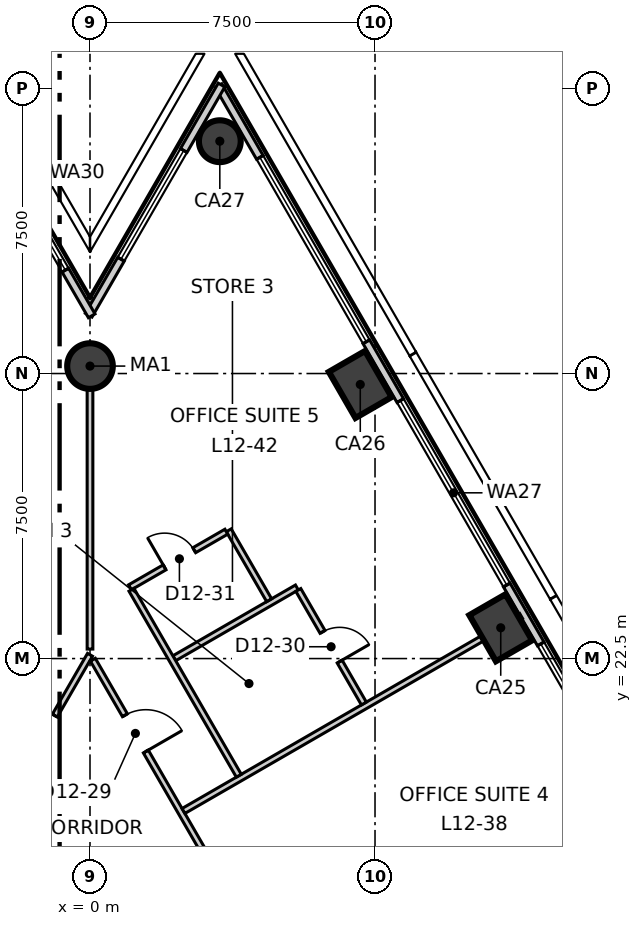
"""IFC4 building model, lengths in metres.
Left out: names, types, materials, properties, quantities, classifications, styles, units other than length and angle.
Written with IfcOpenShell. Run it as: python <this file> out.ifc"""

import sys

from ifc_helpers import new_model, si_unit, direction, frame, frame_2d, origin, origin_2d, place, context, subcontext, project, spatial, rectangle, circle, extrude, element, fill, save


model = new_model("IFC4")
c1 = context("Model", 3, precision=1e-05, world=origin(), true_north=direction((0.0, 1.0)))
c2 = subcontext(c1, "Body", "Model", "MODEL_VIEW")
j1 = project(units=[si_unit("LENGTHUNIT", "METRE"), si_unit("PLANEANGLEUNIT", "RADIAN")], contexts=[c1])
p1 = place(None, origin())
s1 = spatial("IfcSite", under=j1, at=p1, CompositionType="ELEMENT")
p2 = place(p1, origin())
s2 = spatial("IfcBuilding", under=s1, at=p2, CompositionType="ELEMENT")
p3 = place(p2, frame((0.0, 0.0, 59.3)))
s3 = spatial("IfcBuildingStorey", under=s2, at=p3, CompositionType="ELEMENT", Elevation=59.3)
for number, where, z_axis, x_axis in (
    (1, (10.808, 23.31, -0.3), (0.0, 0.0, 1.0), (-0.5, 0.866, 0.0)),
    (2, (7.112, 29.712, -0.3), (0.0, 0.0, 1.0), (-0.5, 0.866, 0.0)),
):
    element("IfcColumn", number, at=place(p3, frame(where, z_axis=z_axis, x_axis=x_axis)), inside=s3, PredefinedType="COLUMN", context=c2, shape_type="SweptSolid", body=[
        extrude(rectangle(XDim=1.4, YDim=1.1, at=origin_2d()), origin(), (0.0, 0.0, 1.0), 4.0),
    ])
p4 = place(p3, frame((3.416, 36.113, -0.3), z_axis=(0.0, 0.0, 1.0), x_axis=(-0.5, 0.866025403784, 0.0)))
e3 = element("IfcColumn", 3, at=p4, inside=s3, PredefinedType="COLUMN", context=c2, shape_type="SweptSolid", body=[
    extrude(circle(Radius=0.55, at=origin_2d()), origin(), (0.0, 0.0, 1.0), 4.0),
])
p5 = place(p3, frame((0.0, 30.196, -0.3), z_axis=(0.0, 0.0, 1.0), x_axis=(1.0, 0.0, 0.0)))
e4 = element("IfcColumn", 4, at=p5, inside=s3, PredefinedType="COLUMN", context=c2, shape_type="SweptSolid", body=[
    extrude(circle(Radius=0.6, at=origin_2d()), origin(), (0.0, 0.0, 1.0), 4.0),
])
p6 = place(p3, frame((34.241, -15.876, 0.0), z_axis=(0.0, 0.0, 1.0), x_axis=(-0.500006313899, 0.866021758423, 0.0)))
e5 = element("IfcWall", 5, at=p6, inside=s3, PredefinedType="ELEMENTEDWALL", context=c2, shape_type="SweptSolid", body=[
    extrude(rectangle(XDim=61.719, YDim=0.2, at=frame_2d((30.859, 0.0))), origin(), (0.0, 0.0, 1.0), 3.7),
])
p7 = place(p6, frame((2.199, 0.0, 0.9)))
e6 = element("IfcOpeningElement", 6, at=p7, cuts=e5, PredefinedType="OPENING", context=c2, shape_type="SweptSolid", body=[
    extrude(rectangle(XDim=5.6, YDim=2.5, at=frame_2d((2.8, 1.25))), frame((0.0, 0.11, 0.0), z_axis=(0.0, -1.0, 0.0), x_axis=(1.0, 0.0, 0.0)), (0.0, 0.0, 1.0), 0.22),
])
p8 = place(p6, frame((9.59, 0.0, 0.9)))
e7 = element("IfcOpeningElement", 7, at=p8, cuts=e5, PredefinedType="OPENING", context=c2, shape_type="SweptSolid", body=[
    extrude(rectangle(XDim=5.6, YDim=2.5, at=frame_2d((2.8, 1.25))), frame((0.0, 0.11, 0.0), z_axis=(0.0, -1.0, 0.0), x_axis=(1.0, 0.0, 0.0)), (0.0, 0.0, 1.0), 0.22),
])
p9 = place(p6, frame((16.982, 0.0, 0.9)))
e8 = element("IfcOpeningElement", 8, at=p9, cuts=e5, PredefinedType="OPENING", context=c2, shape_type="SweptSolid", body=[
    extrude(rectangle(XDim=5.6, YDim=2.5, at=frame_2d((2.8, 1.25))), frame((0.0, 0.11, 0.0), z_axis=(0.0, -1.0, 0.0), x_axis=(1.0, 0.0, 0.0)), (0.0, 0.0, 1.0), 0.22),
])
p10 = place(p6, frame((24.374, 0.0, 0.9)))
e9 = element("IfcOpeningElement", 9, at=p10, cuts=e5, PredefinedType="OPENING", context=c2, shape_type="SweptSolid", body=[
    extrude(rectangle(XDim=5.6, YDim=2.5, at=frame_2d((2.8, 1.25))), frame((0.0, 0.11, 0.0), z_axis=(0.0, -1.0, 0.0), x_axis=(1.0, 0.0, 0.0)), (0.0, 0.0, 1.0), 0.22),
])
p11 = place(p6, frame((31.765, 0.0, 0.9)))
e10 = element("IfcOpeningElement", 10, at=p11, cuts=e5, PredefinedType="OPENING", context=c2, shape_type="SweptSolid", body=[
    extrude(rectangle(XDim=5.6, YDim=2.5, at=frame_2d((2.8, 1.25))), frame((0.0, 0.11, 0.0), z_axis=(0.0, -1.0, 0.0), x_axis=(1.0, 0.0, 0.0)), (0.0, 0.0, 1.0), 0.22),
])
p12 = place(p6, frame((39.157, 0.0, 0.9)))
e11 = element("IfcOpeningElement", 11, at=p12, cuts=e5, PredefinedType="OPENING", context=c2, shape_type="SweptSolid", body=[
    extrude(rectangle(XDim=5.6, YDim=2.5, at=frame_2d((2.8, 1.25))), frame((0.0, 0.11, 0.0), z_axis=(0.0, -1.0, 0.0), x_axis=(1.0, 0.0, 0.0)), (0.0, 0.0, 1.0), 0.22),
])
p13 = place(p6, frame((46.549, 0.0, 0.9)))
e12 = element("IfcOpeningElement", 12, at=p13, cuts=e5, PredefinedType="OPENING", context=c2, shape_type="SweptSolid", body=[
    extrude(rectangle(XDim=5.6, YDim=2.5, at=frame_2d((2.8, 1.25))), frame((0.0, 0.11, 0.0), z_axis=(0.0, -1.0, 0.0), x_axis=(1.0, 0.0, 0.0)), (0.0, 0.0, 1.0), 0.22),
])
p14 = place(p6, frame((53.94, 0.0, 0.9)))
e13 = element("IfcOpeningElement", 13, at=p14, cuts=e5, PredefinedType="OPENING", context=c2, shape_type="SweptSolid", body=[
    extrude(rectangle(XDim=5.6, YDim=2.5, at=frame_2d((2.8, 1.25))), frame((0.0, 0.11, 0.0), z_axis=(0.0, -1.0, 0.0), x_axis=(1.0, 0.0, 0.0)), (0.0, 0.0, 1.0), 0.22),
])
p15 = place(p3, frame((3.461, 37.591, 0.0), z_axis=(0.0, 0.0, 1.0), x_axis=(-0.499927968592, -0.866066987143, 0.0)))
e14 = element("IfcWall", 14, at=p15, inside=s3, PredefinedType="ELEMENTEDWALL", context=c2, shape_type="SweptSolid", body=[
    extrude(rectangle(XDim=6.993, YDim=0.2, at=frame_2d((3.496, 0.0))), origin(), (0.0, 0.0, 1.0), 3.7),
])
p16 = place(p15, frame((1.99, 0.0, 0.9)))
e15 = element("IfcOpeningElement", 15, at=p16, cuts=e14, PredefinedType="OPENING", context=c2, shape_type="SweptSolid", body=[
    extrude(rectangle(XDim=3.3, YDim=2.5, at=frame_2d((1.65, 1.25))), frame((0.0, 0.11, 0.0), z_axis=(0.0, -1.0, 0.0), x_axis=(1.0, 0.0, 0.0)), (0.0, 0.0, 1.0), 0.22),
])
p17 = place(p3, frame((0.045, 31.518, 0.0), z_axis=(0.0, 0.0, 1.0), x_axis=(-0.499943085557, 0.86605826086, 0.0)))
e16 = element("IfcWall", 16, at=p17, inside=s3, PredefinedType="ELEMENTEDWALL", context=c2, shape_type="SweptSolid", body=[
    extrude(rectangle(XDim=6.992, YDim=0.2, at=frame_2d((3.496, 0.0))), origin(), (0.0, 0.0, 1.0), 3.7),
])
p18 = place(p17, frame((1.39, 0.0, 0.9)))
e17 = element("IfcOpeningElement", 17, at=p18, cuts=e16, PredefinedType="OPENING", context=c2, shape_type="SweptSolid", body=[
    extrude(rectangle(XDim=3.3, YDim=2.5, at=frame_2d((1.65, 1.25))), frame((0.0, 0.11, 0.0), z_axis=(0.0, -1.0, 0.0), x_axis=(1.0, 0.0, 0.0)), (0.0, 0.0, 1.0), 0.22),
])
p19 = place(p3, frame((-19.497, -11.17, 0.0), z_axis=(0.0, 0.0, 1.0), x_axis=(0.499998854553, 0.866026065108, 0.0)))
e18 = element("IfcWall", 18, at=p19, inside=s3, PredefinedType="PARTITIONING", context=c2, shape_type="SweptSolid", body=[
    extrude(rectangle(XDim=38.994, YDim=0.15, at=frame_2d((19.497, 0.0))), origin(), (0.0, 0.0, 1.0), 3.7),
])
p20 = place(p19, frame((36.044, 0.0, 0.0)))
e19 = element("IfcOpeningElement", 19, at=p20, cuts=e18, PredefinedType="OPENING", context=c2, shape_type="SweptSolid", body=[
    extrude(rectangle(XDim=1.1, YDim=2.1, at=frame_2d((0.55, 1.05))), frame((0.0, 0.085, 0.0), z_axis=(0.0, -1.0, 0.0), x_axis=(1.0, 0.0, 0.0)), (0.0, 0.0, 1.0), 0.17),
])
p21 = place(p19, frame((21.855, 0.0, 0.0)))
e20 = element("IfcOpeningElement", 20, at=p21, cuts=e18, PredefinedType="OPENING", context=c2, shape_type="SweptSolid", body=[
    extrude(rectangle(XDim=1.1, YDim=2.1, at=frame_2d((0.55, 1.05))), frame((0.0, 0.085, 0.0), z_axis=(0.0, -1.0, 0.0), x_axis=(1.0, 0.0, 0.0)), (0.0, 0.0, 1.0), 0.17),
])
p22 = place(p19, frame((32.155, 0.0, 0.0)))
e21 = element("IfcOpeningElement", 21, at=p22, cuts=e18, PredefinedType="OPENING", context=c2, shape_type="SweptSolid", body=[
    extrude(rectangle(XDim=0.9, YDim=2.1, at=frame_2d((0.45, 1.05))), frame((0.0, 0.085, 0.0), z_axis=(0.0, -1.0, 0.0), x_axis=(1.0, 0.0, 0.0)), (0.0, 0.0, 1.0), 0.17),
])
p23 = place(p19, frame((28.955, 0.0, 0.0)))
e22 = element("IfcOpeningElement", 22, at=p23, cuts=e18, PredefinedType="OPENING", context=c2, shape_type="SweptSolid", body=[
    extrude(rectangle(XDim=0.9, YDim=2.1, at=frame_2d((0.45, 1.05))), frame((0.0, 0.085, 0.0), z_axis=(0.0, -1.0, 0.0), x_axis=(1.0, 0.0, 0.0)), (0.0, 0.0, 1.0), 0.17),
])
p24 = place(p19, frame((26.055, 0.0, 0.0)))
e23 = element("IfcOpeningElement", 23, at=p24, cuts=e18, PredefinedType="OPENING", context=c2, shape_type="SweptSolid", body=[
    extrude(rectangle(XDim=1.0, YDim=2.1, at=frame_2d((0.5, 1.05))), frame((0.0, 0.085, 0.0), z_axis=(0.0, -1.0, 0.0), x_axis=(1.0, 0.0, 0.0)), (0.0, 0.0, 1.0), 0.17),
])
p25 = place(p19, frame((10.373, 0.0, 0.0)))
e24 = element("IfcOpeningElement", 24, at=p25, cuts=e18, PredefinedType="OPENING", context=c2, shape_type="SweptSolid", body=[
    extrude(rectangle(XDim=1.0, YDim=2.1, at=frame_2d((0.5, 1.05))), frame((0.0, 0.085, 0.0), z_axis=(0.0, -1.0, 0.0), x_axis=(1.0, 0.0, 0.0)), (0.0, 0.0, 1.0), 0.17),
])
p26 = place(p19, frame((17.773, 0.0, 0.0)))
e25 = element("IfcOpeningElement", 25, at=p26, cuts=e18, PredefinedType="OPENING", context=c2, shape_type="SweptSolid", body=[
    extrude(rectangle(XDim=0.9, YDim=2.1, at=frame_2d((0.45, 1.05))), frame((0.0, 0.085, 0.0), z_axis=(0.0, -1.0, 0.0), x_axis=(1.0, 0.0, 0.0)), (0.0, 0.0, 1.0), 0.17),
])
p27 = place(p19, frame((1.689, 0.0, 0.0)))
e26 = element("IfcOpeningElement", 26, at=p27, cuts=e18, PredefinedType="OPENING", context=c2, shape_type="SweptSolid", body=[
    extrude(rectangle(XDim=1.1, YDim=2.1, at=frame_2d((0.55, 1.05))), frame((0.0, 0.085, 0.0), z_axis=(0.0, -1.0, 0.0), x_axis=(1.0, 0.0, 0.0)), (0.0, 0.0, 1.0), 0.17),
])
p28 = place(p3, frame((0.0, 22.75, 0.0), z_axis=(0.0, 0.0, 1.0), x_axis=(0.0, 1.0, 0.0)))
e27 = element("IfcWall", 27, at=p28, inside=s3, PredefinedType="PARTITIONING", context=c2, shape_type="SweptSolid", body=[
    extrude(rectangle(XDim=8.066, YDim=0.15, at=frame_2d((4.033, 0.0))), origin(), (0.0, 0.0, 1.0), 3.1),
])
p29 = place(p3, frame((0.075, 22.47, 0.0), z_axis=(0.0, 0.0, 1.0), x_axis=(0.500002280369, -0.866024087209, 0.0)))
e28 = element("IfcWall", 28, at=p29, inside=s3, PredefinedType="PARTITIONING", context=c2, shape_type="SweptSolid", body=[
    extrude(rectangle(XDim=38.844, YDim=0.15, at=frame_2d((19.422, 0.0))), origin(), (0.0, 0.0, 1.0), 3.7),
])
p30 = place(p29, frame((36.044, 0.0, 0.0)))
e29 = element("IfcOpeningElement", 29, at=p30, cuts=e28, PredefinedType="OPENING", context=c2, shape_type="SweptSolid", body=[
    extrude(rectangle(XDim=1.1, YDim=2.1, at=frame_2d((0.55, 1.05))), frame((0.0, 0.085, 0.0), z_axis=(0.0, -1.0, 0.0), x_axis=(1.0, 0.0, 0.0)), (0.0, 0.0, 1.0), 0.17),
])
p31 = place(p29, frame((26.255, 0.0, 0.0)))
e30 = element("IfcOpeningElement", 30, at=p31, cuts=e28, PredefinedType="OPENING", context=c2, shape_type="SweptSolid", body=[
    extrude(rectangle(XDim=1.1, YDim=2.1, at=frame_2d((0.55, 1.05))), frame((0.0, 0.085, 0.0), z_axis=(0.0, -1.0, 0.0), x_axis=(1.0, 0.0, 0.0)), (0.0, 0.0, 1.0), 0.17),
])
p32 = place(p29, frame((9.173, 0.0, 0.0)))
e31 = element("IfcOpeningElement", 31, at=p32, cuts=e28, PredefinedType="OPENING", context=c2, shape_type="SweptSolid", body=[
    extrude(rectangle(XDim=1.1, YDim=2.1, at=frame_2d((0.55, 1.05))), frame((0.0, 0.085, 0.0), z_axis=(0.0, -1.0, 0.0), x_axis=(1.0, 0.0, 0.0)), (0.0, 0.0, 1.0), 0.17),
])
p33 = place(p29, frame((17.373, 0.0, 0.0)))
e32 = element("IfcOpeningElement", 32, at=p33, cuts=e28, PredefinedType="OPENING", context=c2, shape_type="SweptSolid", body=[
    extrude(rectangle(XDim=0.9, YDim=2.1, at=frame_2d((0.45, 1.05))), frame((0.0, 0.085, 0.0), z_axis=(0.0, -1.0, 0.0), x_axis=(1.0, 0.0, 0.0)), (0.0, 0.0, 1.0), 0.17),
])
p34 = place(p29, frame((14.173, 0.0, 0.0)))
e33 = element("IfcOpeningElement", 33, at=p34, cuts=e28, PredefinedType="OPENING", context=c2, shape_type="SweptSolid", body=[
    extrude(rectangle(XDim=0.9, YDim=2.1, at=frame_2d((0.45, 1.05))), frame((0.0, 0.085, 0.0), z_axis=(0.0, -1.0, 0.0), x_axis=(1.0, 0.0, 0.0)), (0.0, 0.0, 1.0), 0.17),
])
p35 = place(p29, frame((11.273, 0.0, 0.0)))
e34 = element("IfcOpeningElement", 34, at=p35, cuts=e28, PredefinedType="OPENING", context=c2, shape_type="SweptSolid", body=[
    extrude(rectangle(XDim=1.0, YDim=2.1, at=frame_2d((0.5, 1.05))), frame((0.0, 0.085, 0.0), z_axis=(0.0, -1.0, 0.0), x_axis=(1.0, 0.0, 0.0)), (0.0, 0.0, 1.0), 0.17),
])
p36 = place(p29, frame((1.689, 0.0, 0.0)))
e35 = element("IfcOpeningElement", 35, at=p36, cuts=e28, PredefinedType="OPENING", context=c2, shape_type="SweptSolid", body=[
    extrude(rectangle(XDim=1.1, YDim=2.1, at=frame_2d((0.55, 1.05))), frame((0.0, 0.085, 0.0), z_axis=(0.0, -1.0, 0.0), x_axis=(1.0, 0.0, 0.0)), (0.0, 0.0, 1.0), 0.17),
])
p37 = place(p3, frame((2.46, 18.49, 0.0), z_axis=(0.0, 0.0, 1.0), x_axis=(0.866010033384, 0.500026621369, 0.0)))
e36 = element("IfcWall", 36, at=p37, inside=s3, PredefinedType="PARTITIONING", context=c2, shape_type="SweptSolid", body=[
    extrude(rectangle(XDim=10.26, YDim=0.15, at=frame_2d((5.13, 0.0))), origin(), (0.0, 0.0, 1.0), 3.7),
])
p38 = place(p3, frame((2.218, 22.508, 0.0), z_axis=(0.0, 0.0, 1.0), x_axis=(0.866085180849, 0.499896448792, 0.0)))
e37 = element("IfcWall", 37, at=p38, inside=s3, PredefinedType="PARTITIONING", context=c2, shape_type="SweptSolid", body=[
    extrude(rectangle(XDim=3.725, YDim=0.15, at=frame_2d((1.862, 0.0))), origin(), (0.0, 0.0, 1.0), 3.7),
])
p39 = place(p3, frame((3.651, 25.875, 0.0), z_axis=(0.0, 0.0, 1.0), x_axis=(0.500302479123, -0.865850696935, 0.0)))
e38 = element("IfcWall", 38, at=p39, inside=s3, PredefinedType="PARTITIONING", context=c2, shape_type="SweptSolid", body=[
    extrude(rectangle(XDim=2.125, YDim=0.15, at=frame_2d((1.062, 0.0))), origin(), (0.0, 0.0, 1.0), 3.7),
])
p40 = place(p3, frame((1.053, 24.375, 0.0), z_axis=(0.0, 0.0, 1.0), x_axis=(0.866036909293, 0.499980071345, 0.0)))
e39 = element("IfcWall", 39, at=p40, inside=s3, PredefinedType="PARTITIONING", context=c2, shape_type="SweptSolid", body=[
    extrude(rectangle(XDim=2.926, YDim=0.15, at=frame_2d((1.463, 0.0))), origin(), (0.0, 0.0, 1.0), 3.7),
])
p41 = place(p40, frame((1.051, 0.0, 0.0)))
e40 = element("IfcOpeningElement", 40, at=p41, cuts=e39, PredefinedType="OPENING", context=c2, shape_type="SweptSolid", body=[
    extrude(rectangle(XDim=0.9, YDim=2.1, at=frame_2d((0.45, 1.05))), frame((0.0, 0.085, 0.0), z_axis=(0.0, -1.0, 0.0), x_axis=(1.0, 0.0, 0.0)), (0.0, 0.0, 1.0), 0.17),
])
p42 = place(p3, frame((1.091, 24.31, 0.0), z_axis=(0.0, 0.0, 1.0), x_axis=(0.499991765245, -0.86603015807, 0.0)))
e41 = element("IfcWall", 41, at=p42, inside=s3, PredefinedType="PARTITIONING", context=c2, shape_type="SweptSolid", body=[
    extrude(rectangle(XDim=5.65, YDim=0.15, at=frame_2d((2.825, 0.0))), origin(), (0.0, 0.0, 1.0), 3.7),
])
p43 = place(p3, frame((5.482, 24.305, 0.0), z_axis=(0.0, 0.0, 1.0), x_axis=(0.49998991961, -0.866031223622, 0.0)))
e42 = element("IfcWall", 42, at=p43, inside=s3, PredefinedType="PARTITIONING", context=c2, shape_type="SweptSolid", body=[
    extrude(rectangle(XDim=3.45, YDim=0.15, at=frame_2d((1.725, 0.0))), origin(), (0.0, 0.0, 1.0), 3.7),
])
p44 = place(p43, frame((1.275, 0.0, 0.0)))
e43 = element("IfcOpeningElement", 43, at=p44, cuts=e42, PredefinedType="OPENING", context=c2, shape_type="SweptSolid", body=[
    extrude(rectangle(XDim=0.9, YDim=2.1, at=frame_2d((0.45, 1.05))), frame((0.0, 0.085, 0.0), z_axis=(0.0, -1.0, 0.0), x_axis=(1.0, 0.0, 0.0)), (0.0, 0.0, 1.0), 0.17),
])
p45 = place(p12, origin())
e44 = element("IfcWindow", 44, at=p45, inside=s3, PartitioningType="SINGLE_PANEL", PredefinedType="WINDOW", context=c2, shape_type="SweptSolid", body=[
    extrude(rectangle(XDim=5.6, YDim=2.5, at=frame_2d((2.8, 1.25))), frame((0.0, 0.03, 0.0), z_axis=(0.0, -1.0, 0.0), x_axis=(1.0, 0.0, 0.0)), (0.0, 0.0, 1.0), 0.06),
])
fill(e11, e44)
p46 = place(p13, origin())
e45 = element("IfcWindow", 45, at=p46, inside=s3, PartitioningType="SINGLE_PANEL", PredefinedType="WINDOW", context=c2, shape_type="SweptSolid", body=[
    extrude(rectangle(XDim=5.6, YDim=2.5, at=frame_2d((2.8, 1.25))), frame((0.0, 0.03, 0.0), z_axis=(0.0, -1.0, 0.0), x_axis=(1.0, 0.0, 0.0)), (0.0, 0.0, 1.0), 0.06),
])
fill(e12, e45)
p47 = place(p14, origin())
e46 = element("IfcWindow", 46, at=p47, inside=s3, PartitioningType="SINGLE_PANEL", PredefinedType="WINDOW", context=c2, shape_type="SweptSolid", body=[
    extrude(rectangle(XDim=5.6, YDim=2.5, at=frame_2d((2.8, 1.25))), frame((0.0, 0.03, 0.0), z_axis=(0.0, -1.0, 0.0), x_axis=(1.0, 0.0, 0.0)), (0.0, 0.0, 1.0), 0.06),
])
fill(e13, e46)
p48 = place(p16, origin())
e47 = element("IfcWindow", 47, at=p48, inside=s3, PartitioningType="SINGLE_PANEL", PredefinedType="WINDOW", context=c2, shape_type="SweptSolid", body=[
    extrude(rectangle(XDim=3.3, YDim=2.5, at=frame_2d((1.65, 1.25))), frame((0.0, 0.03, 0.0), z_axis=(0.0, -1.0, 0.0), x_axis=(1.0, 0.0, 0.0)), (0.0, 0.0, 1.0), 0.06),
])
fill(e15, e47)
p49 = place(p18, origin())
e48 = element("IfcWindow", 48, at=p49, inside=s3, PartitioningType="SINGLE_PANEL", PredefinedType="WINDOW", context=c2, shape_type="SweptSolid", body=[
    extrude(rectangle(XDim=3.3, YDim=2.5, at=frame_2d((1.65, 1.25))), frame((0.0, 0.03, 0.0), z_axis=(0.0, -1.0, 0.0), x_axis=(1.0, 0.0, 0.0)), (0.0, 0.0, 1.0), 0.06),
])
fill(e17, e48)
p50 = place(p36, origin())
e49 = element("IfcDoor", 49, at=p50, inside=s3, OperationType="SINGLE_SWING_LEFT", PredefinedType="DOOR", context=c2, shape_type="SweptSolid", body=[
    extrude(rectangle(XDim=1.1, YDim=2.1, at=frame_2d((0.55, 1.05))), frame((0.0, 0.025, 0.0), z_axis=(0.0, -1.0, 0.0), x_axis=(1.0, 0.0, 0.0)), (0.0, 0.0, 1.0), 0.05),
])
fill(e35, e49)
p51 = place(p44, origin())
e50 = element("IfcDoor", 50, at=p51, inside=s3, OperationType="SINGLE_SWING_LEFT", PredefinedType="DOOR", context=c2, shape_type="SweptSolid", body=[
    extrude(rectangle(XDim=0.9, YDim=2.1, at=frame_2d((0.45, 1.05))), frame((0.0, 0.025, 0.0), z_axis=(0.0, -1.0, 0.0), x_axis=(1.0, 0.0, 0.0)), (0.0, 0.0, 1.0), 0.05),
])
fill(e43, e50)
p52 = place(p41, origin())
e51 = element("IfcDoor", 51, at=p52, inside=s3, OperationType="SINGLE_SWING_RIGHT", PredefinedType="DOOR", context=c2, shape_type="SweptSolid", body=[
    extrude(rectangle(XDim=0.9, YDim=2.1, at=frame_2d((0.45, 1.05))), frame((0.0, 0.025, 0.0), z_axis=(0.0, -1.0, 0.0), x_axis=(1.0, 0.0, 0.0)), (0.0, 0.0, 1.0), 0.05),
])
fill(e40, e51)
p53 = place(p20, origin())
e52 = element("IfcDoor", 52, at=p53, inside=s3, OperationType="SINGLE_SWING_RIGHT", PredefinedType="DOOR", context=c2, shape_type="SweptSolid", body=[
    extrude(rectangle(XDim=1.1, YDim=2.1, at=frame_2d((0.55, 1.05))), frame((0.0, 0.025, 0.0), z_axis=(0.0, -1.0, 0.0), x_axis=(1.0, 0.0, 0.0)), (0.0, 0.0, 1.0), 0.05),
])
fill(e19, e52)
save(model, sys.argv[1])
